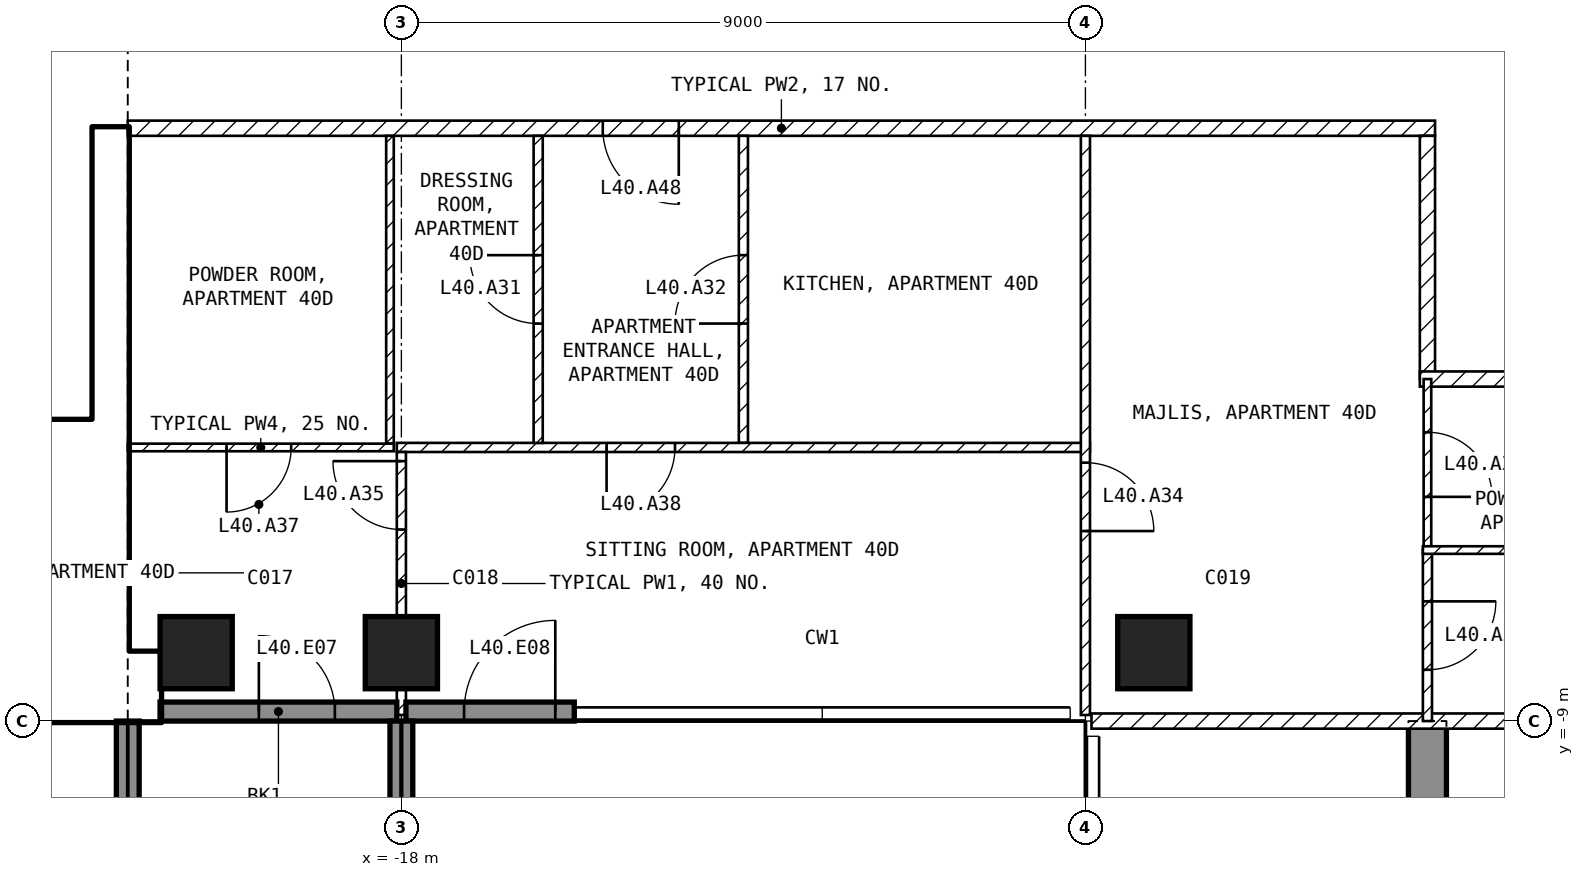
"""IFC4 building model, lengths in metres.
Left out: names, types, materials, properties, quantities, classifications, styles, units other than length and angle.
Written with IfcOpenShell. Run it as: python <this file> out.ifc"""

import sys

from ifc_helpers import new_model, si_unit, direction, frame, frame_2d, origin, origin_2d, place, context, subcontext, project, spatial, polyline, rectangle, outline, extrude, element, fill, save


model = new_model("IFC4")
c1 = context("Model", 3, precision=1e-05, world=origin(), true_north=direction((0.0, 1.0)))
c2 = subcontext(c1, "Body", "Model", "MODEL_VIEW")
j1 = project(units=[si_unit("LENGTHUNIT", "METRE"), si_unit("PLANEANGLEUNIT", "RADIAN")], contexts=[c1])
p1 = place(None, origin())
s1 = spatial("IfcSite", under=j1, at=p1, CompositionType="ELEMENT")
p2 = place(p1, origin())
s2 = spatial("IfcBuilding", under=s1, at=p2, CompositionType="ELEMENT")
p3 = place(p2, frame((0.0, 0.0, 166.6)))
s3 = spatial("IfcBuildingStorey", under=s2, at=p3, CompositionType="ELEMENT", Elevation=166.6)
for number, where, z_axis, x_axis in (
    (1, (-20.7, -8.1, -0.25), (0.0, 0.0, 1.0), (1.0, 0.0, 0.0)),
    (2, (-18.0, -8.1, -0.25), (0.0, 0.0, 1.0), (1.0, 0.0, 0.0)),
    (3, (-8.1, -8.1, -0.25), (0.0, 0.0, 1.0), (1.0, 0.0, 0.0)),
):
    element("IfcColumn", number, at=place(p3, frame(where, z_axis=z_axis, x_axis=x_axis)), inside=s3, PredefinedType="COLUMN", context=c2, shape_type="SweptSolid", body=[
        extrude(rectangle(XDim=0.95, YDim=0.95, at=origin_2d()), origin(), (0.0, 0.0, 1.0), 3.5),
    ])
p4 = place(p3, frame((-4.75, -20.225, -0.25), z_axis=(1.0, 0.0, 0.0), x_axis=(0.0, 1.0, 0.0)))
e4 = element("IfcWall", 4, at=p4, inside=s3, PredefinedType="SHEAR", context=c2, shape_type="SweptSolid", body=[
    extrude(outline(polyline([(0.0, 0.0), (6.725, 0.0), (6.725, 2.65), (9.125, 2.65), (9.125, 0.0), (11.225, 0.0), (11.225, 3.5), (0.0, 3.5), (0.0, 0.0)])), origin(), (0.0, 0.0, 1.0), 0.5),
])
p5 = place(p3, frame((-21.175, -8.875, 0.0), z_axis=(0.0, 0.0, 1.0), x_axis=(1.0, 0.0, 0.0)))
e5 = element("IfcWall", 5, at=p5, inside=s3, PredefinedType="SOLIDWALL", context=c2, shape_type="SweptSolid", body=[
    extrude(rectangle(XDim=3.115, YDim=0.25, at=frame_2d((1.558, 0.0))), origin(), (0.0, 0.0, 1.0), 3.25),
])
p6 = place(p5, frame((1.3, 0.0, 0.0)))
e6 = element("IfcOpeningElement", 6, at=p6, cuts=e5, PredefinedType="OPENING", context=c2, shape_type="SweptSolid", body=[
    extrude(rectangle(XDim=1.0, YDim=2.4, at=frame_2d((0.5, 1.2))), frame((0.0, 0.135, 0.0), z_axis=(0.0, -1.0, 0.0), x_axis=(1.0, 0.0, 0.0)), (0.0, 0.0, 1.0), 0.27),
])
p7 = place(p3, frame((-17.94, -8.875, 0.0), z_axis=(0.0, 0.0, 1.0), x_axis=(1.0, 0.0, 0.0)))
e7 = element("IfcWall", 7, at=p7, inside=s3, PredefinedType="SOLIDWALL", context=c2, shape_type="SweptSolid", body=[
    extrude(rectangle(XDim=2.215, YDim=0.25, at=frame_2d((1.107, 0.0))), origin(), (0.0, 0.0, 1.0), 3.25),
])
p8 = place(p7, frame((0.765, 0.0, 0.0)))
e8 = element("IfcOpeningElement", 8, at=p8, cuts=e7, PredefinedType="OPENING", context=c2, shape_type="SweptSolid", body=[
    extrude(rectangle(XDim=1.2, YDim=2.4, at=frame_2d((0.6, 1.2))), frame((0.0, 0.135, 0.0), z_axis=(0.0, -1.0, 0.0), x_axis=(1.0, 0.0, 0.0)), (0.0, 0.0, 1.0), 0.27),
])
for number, where, z_axis, x_axis in (
    (9, (-21.6, -9.0, 0.0), (0.0, 0.0, 1.0), (0.0, -1.0, 0.0)),
    (10, (-18.0, -9.0, 0.0), (0.0, 0.0, 1.0), (0.0, -1.0, 0.0)),
):
    element("IfcWall", number, at=place(p3, frame(where, z_axis=z_axis, x_axis=x_axis)), inside=s3, PredefinedType="SOLIDWALL", context=c2, shape_type="SweptSolid", body=[
        extrude(rectangle(XDim=2.7, YDim=0.3, at=frame_2d((1.35, 0.0))), origin(), (0.0, 0.0, 1.0), 3.25),
    ])
p9 = place(p3, frame((-30.2, -8.55, 0.0), z_axis=(0.0, 0.0, 1.0), x_axis=(1.0, 0.0, 0.0)))
e11 = element("IfcWall", 11, at=p9, inside=s3, PredefinedType="SHEAR", context=c2, shape_type="SweptSolid", body=[
    extrude(rectangle(XDim=9.025, YDim=0.9, at=frame_2d((4.512, 0.0))), origin(), (0.0, 0.0, 1.0), 3.25),
])
p10 = place(p3, frame((-21.825, -8.1, 0.0), z_axis=(0.0, 0.0, 1.0), x_axis=(0.0, 1.0, 0.0)))
e12 = element("IfcWall", 12, at=p10, inside=s3, PredefinedType="SHEAR", context=c2, shape_type="SweptSolid", body=[
    extrude(rectangle(XDim=6.9, YDim=0.45, at=frame_2d((3.45, 0.0))), origin(), (0.0, 0.0, 1.0), 3.25),
])
p11 = place(p3, frame((-28.35, -5.15, 0.0), z_axis=(0.0, 0.0, 1.0), x_axis=(1.0, 0.0, 0.0)))
e13 = element("IfcWall", 13, at=p11, inside=s3, PredefinedType="SOLIDWALL", context=c2, shape_type="SweptSolid", body=[
    extrude(rectangle(XDim=6.3, YDim=0.2, at=frame_2d((3.15, 0.0))), origin(), (0.0, 0.0, 1.0), 3.25),
])
p12 = place(p11, frame((5.1, 0.0, 0.0)))
e14 = element("IfcOpeningElement", 14, at=p12, cuts=e13, PredefinedType="OPENING", context=c2, shape_type="SweptSolid", body=[
    extrude(rectangle(XDim=1.0, YDim=2.1, at=frame_2d((0.5, 1.05))), frame((0.0, 0.11, 0.0), z_axis=(0.0, -1.0, 0.0), x_axis=(1.0, 0.0, 0.0)), (0.0, 0.0, 1.0), 0.22),
])
p13 = place(p3, frame((-4.4, -1.2, 0.0), z_axis=(0.0, 0.0, 1.0), x_axis=(-1.0, 0.0, 0.0)))
e15 = element("IfcWall", 15, at=p13, inside=s3, PredefinedType="PARTITIONING", context=c2, shape_type="SweptSolid", body=[
    extrude(rectangle(XDim=17.2, YDim=0.2, at=frame_2d((8.6, 0.0))), origin(), (0.0, 0.0, 1.0), 3.25),
])
p14 = place(p13, frame((9.95, 0.0, 0.0)))
e16 = element("IfcOpeningElement", 16, at=p14, cuts=e15, PredefinedType="OPENING", context=c2, shape_type="SweptSolid", body=[
    extrude(rectangle(XDim=1.0, YDim=2.1, at=frame_2d((0.5, 1.05))), frame((0.0, 0.11, 0.0), z_axis=(0.0, -1.0, 0.0), x_axis=(1.0, 0.0, 0.0)), (0.0, 0.0, 1.0), 0.22),
])
p15 = place(p3, frame((-4.5, -4.5, 0.0), z_axis=(0.0, 0.0, 1.0), x_axis=(0.0, 1.0, 0.0)))
e17 = element("IfcWall", 17, at=p15, inside=s3, PredefinedType="PARTITIONING", context=c2, shape_type="SweptSolid", body=[
    extrude(rectangle(XDim=3.2, YDim=0.2, at=frame_2d((1.6, 0.0))), origin(), (0.0, 0.0, 1.0), 3.25),
])
p16 = place(p3, frame((-1.1, -4.5, 0.0), z_axis=(0.0, 0.0, 1.0), x_axis=(-1.0, 0.0, 0.0)))
e18 = element("IfcWall", 18, at=p16, inside=s3, PredefinedType="PARTITIONING", context=c2, shape_type="SweptSolid", body=[
    extrude(rectangle(XDim=3.5, YDim=0.2, at=frame_2d((1.75, 0.0))), origin(), (0.0, 0.0, 1.0), 3.25),
])
p17 = place(p3, frame((8.92, -9.0, 0.0), z_axis=(0.0, 0.0, 1.0), x_axis=(-1.0, 0.0, 0.0)))
e19 = element("IfcWall", 19, at=p17, inside=s3, PredefinedType="PARTITIONING", context=c2, shape_type="SweptSolid", body=[
    extrude(rectangle(XDim=17.84, YDim=0.2, at=frame_2d((8.92, 0.0))), origin(), (0.0, 0.0, 1.0), 3.25),
])
p18 = place(p17, frame((8.42, 0.0, 0.0)))
e20 = element("IfcOpeningElement", 20, at=p18, cuts=e19, PredefinedType="OPENING", context=c2, shape_type="SweptSolid", body=[
    extrude(rectangle(XDim=1.0, YDim=2.1, at=frame_2d((0.5, 1.05))), frame((0.0, 0.11, 0.0), z_axis=(0.0, -1.0, 0.0), x_axis=(1.0, 0.0, 0.0)), (0.0, 0.0, 1.0), 0.22),
])
p19 = place(p3, frame((-13.5, -5.34, 0.0), z_axis=(0.0, 0.0, 1.0), x_axis=(0.0, 1.0, 0.0)))
e21 = element("IfcWall", 21, at=p19, inside=s3, PredefinedType="PARTITIONING", context=c2, shape_type="SweptSolid", body=[
    extrude(rectangle(XDim=4.04, YDim=0.12, at=frame_2d((2.02, 0.0))), origin(), (0.0, 0.0, 1.0), 3.25),
])
p20 = place(p19, frame((1.57, 0.0, 0.0)))
e22 = element("IfcOpeningElement", 22, at=p20, cuts=e21, PredefinedType="OPENING", context=c2, shape_type="SweptSolid", body=[
    extrude(rectangle(XDim=0.9, YDim=2.1, at=frame_2d((0.45, 1.05))), frame((0.0, 0.07, 0.0), z_axis=(0.0, -1.0, 0.0), x_axis=(1.0, 0.0, 0.0)), (0.0, 0.0, 1.0), 0.14),
])
p21 = place(p3, frame((-8.94, -5.4, 0.0), z_axis=(0.0, 0.0, 1.0), x_axis=(-1.0, 0.0, 0.0)))
e23 = element("IfcWall", 23, at=p21, inside=s3, PredefinedType="PARTITIONING", context=c2, shape_type="SweptSolid", body=[
    extrude(rectangle(XDim=9.12, YDim=0.12, at=frame_2d((4.56, 0.0))), origin(), (0.0, 0.0, 1.0), 3.25),
])
p22 = place(p21, frame((5.46, 0.0, 0.0)))
e24 = element("IfcOpeningElement", 24, at=p22, cuts=e23, PredefinedType="OPENING", context=c2, shape_type="SweptSolid", body=[
    extrude(rectangle(XDim=0.9, YDim=2.1, at=frame_2d((0.45, 1.05))), frame((0.0, 0.07, 0.0), z_axis=(0.0, -1.0, 0.0), x_axis=(1.0, 0.0, 0.0)), (0.0, 0.0, 1.0), 0.14),
])
p23 = place(p3, frame((-9.0, -1.3, 0.0), z_axis=(0.0, 0.0, 1.0), x_axis=(0.0, -1.0, 0.0)))
e25 = element("IfcWall", 25, at=p23, inside=s3, PredefinedType="PARTITIONING", context=c2, shape_type="SweptSolid", body=[
    extrude(rectangle(XDim=7.62, YDim=0.12, at=frame_2d((3.81, 0.0))), origin(), (0.0, 0.0, 1.0), 3.25),
])
p24 = place(p23, frame((4.3, 0.0, 0.0)))
e26 = element("IfcOpeningElement", 26, at=p24, cuts=e25, PredefinedType="OPENING", context=c2, shape_type="SweptSolid", body=[
    extrude(rectangle(XDim=0.9, YDim=2.1, at=frame_2d((0.45, 1.05))), frame((0.0, 0.07, 0.0), z_axis=(0.0, -1.0, 0.0), x_axis=(1.0, 0.0, 0.0)), (0.0, 0.0, 1.0), 0.14),
])
p25 = place(p3, frame((-16.2, -5.34, 0.0), z_axis=(0.0, 0.0, 1.0), x_axis=(0.0, 1.0, 0.0)))
e27 = element("IfcWall", 27, at=p25, inside=s3, PredefinedType="PARTITIONING", context=c2, shape_type="SweptSolid", body=[
    extrude(rectangle(XDim=4.04, YDim=0.12, at=frame_2d((2.02, 0.0))), origin(), (0.0, 0.0, 1.0), 3.25),
])
p26 = place(p25, frame((1.57, 0.0, 0.0)))
e28 = element("IfcOpeningElement", 28, at=p26, cuts=e27, PredefinedType="OPENING", context=c2, shape_type="SweptSolid", body=[
    extrude(rectangle(XDim=0.9, YDim=2.1, at=frame_2d((0.45, 1.05))), frame((0.0, 0.07, 0.0), z_axis=(0.0, -1.0, 0.0), x_axis=(1.0, 0.0, 0.0)), (0.0, 0.0, 1.0), 0.14),
])
p27 = place(p3, frame((-18.15, -5.35, 0.0), z_axis=(0.0, 0.0, 1.0), x_axis=(0.0, 1.0, 0.0)))
e29 = element("IfcWall", 29, at=p27, inside=s3, PredefinedType="PARTITIONING", context=c2, shape_type="SweptSolid", body=[
    extrude(rectangle(XDim=4.05, YDim=0.1, at=frame_2d((2.025, 0.0))), origin(), (0.0, 0.0, 1.0), 2.48),
])
p28 = place(p3, frame((-18.1, -5.4, 0.0), z_axis=(0.0, 0.0, 1.0), x_axis=(-1.0, 0.0, 0.0)))
e30 = element("IfcWall", 30, at=p28, inside=s3, PredefinedType="PARTITIONING", context=c2, shape_type="SweptSolid", body=[
    extrude(rectangle(XDim=3.5, YDim=0.1, at=frame_2d((1.75, 0.0))), origin(), (0.0, 0.0, 1.0), 3.25),
])
p29 = place(p28, frame((1.35, 0.0, 0.0)))
e31 = element("IfcOpeningElement", 31, at=p29, cuts=e30, PredefinedType="OPENING", context=c2, shape_type="SweptSolid", body=[
    extrude(rectangle(XDim=0.85, YDim=2.1, at=frame_2d((0.425, 1.05))), frame((0.0, 0.06, 0.0), z_axis=(0.0, -1.0, 0.0), x_axis=(1.0, 0.0, 0.0)), (0.0, 0.0, 1.0), 0.12),
])
p30 = place(p3, frame((-18.0, -8.92, 0.0), z_axis=(0.0, 0.0, 1.0), x_axis=(0.0, 1.0, 0.0)))
e32 = element("IfcWall", 32, at=p30, inside=s3, PredefinedType="PARTITIONING", context=c2, shape_type="SweptSolid", body=[
    extrude(rectangle(XDim=3.46, YDim=0.12, at=frame_2d((1.73, 0.0))), origin(), (0.0, 0.0, 1.0), 2.48),
])
p31 = place(p30, frame((2.44, 0.0, 0.0)))
e33 = element("IfcOpeningElement", 33, at=p31, cuts=e32, PredefinedType="OPENING", context=c2, shape_type="SweptSolid", body=[
    extrude(rectangle(XDim=0.9, YDim=2.1, at=frame_2d((0.45, 1.05))), frame((0.0, 0.07, 0.0), z_axis=(0.0, -1.0, 0.0), x_axis=(1.0, 0.0, 0.0)), (0.0, 0.0, 1.0), 0.14),
])
p32 = place(p3, frame((-4.5, -4.5, 0.0), z_axis=(0.0, 0.0, 1.0), x_axis=(0.0, -1.0, 0.0)))
e34 = element("IfcWall", 34, at=p32, inside=s3, PredefinedType="PARTITIONING", context=c2, shape_type="SweptSolid", body=[
    extrude(rectangle(XDim=2.25, YDim=0.1, at=frame_2d((1.125, 0.0))), origin(), (0.0, 0.0, 1.0), 3.25),
])
p33 = place(p32, frame((0.7, 0.0, 0.0)))
e35 = element("IfcOpeningElement", 35, at=p33, cuts=e34, PredefinedType="OPENING", context=c2, shape_type="SweptSolid", body=[
    extrude(rectangle(XDim=0.85, YDim=2.1, at=frame_2d((0.425, 1.05))), frame((0.0, 0.06, 0.0), z_axis=(0.0, -1.0, 0.0), x_axis=(1.0, 0.0, 0.0)), (0.0, 0.0, 1.0), 0.12),
])
p34 = place(p3, frame((-4.5, -6.75, 0.0), z_axis=(0.0, 0.0, 1.0), x_axis=(0.0, -1.0, 0.0)))
e36 = element("IfcWall", 36, at=p34, inside=s3, PredefinedType="PARTITIONING", context=c2, shape_type="SweptSolid", body=[
    extrude(rectangle(XDim=2.25, YDim=0.12, at=frame_2d((1.125, 0.0))), origin(), (0.0, 0.0, 1.0), 3.25),
])
p35 = place(p34, frame((0.675, 0.0, 0.0)))
e37 = element("IfcOpeningElement", 37, at=p35, cuts=e36, PredefinedType="OPENING", context=c2, shape_type="SweptSolid", body=[
    extrude(rectangle(XDim=0.9, YDim=2.1, at=frame_2d((0.45, 1.05))), frame((0.0, 0.07, 0.0), z_axis=(0.0, -1.0, 0.0), x_axis=(1.0, 0.0, 0.0)), (0.0, 0.0, 1.0), 0.14),
])
p36 = place(p3, frame((-1.1, -6.75, 0.0), z_axis=(0.0, 0.0, 1.0), x_axis=(-1.0, 0.0, 0.0)))
e38 = element("IfcWall", 38, at=p36, inside=s3, PredefinedType="PARTITIONING", context=c2, shape_type="SweptSolid", body=[
    extrude(rectangle(XDim=3.46, YDim=0.1, at=frame_2d((1.73, 0.0))), origin(), (0.0, 0.0, 1.0), 3.25),
])
p37 = place(p6, origin())
e39 = element("IfcDoor", 39, at=p37, inside=s3, OperationType="SINGLE_SWING_LEFT", PredefinedType="DOOR", context=c2, shape_type="SweptSolid", body=[
    extrude(rectangle(XDim=1.0, YDim=2.4, at=frame_2d((0.5, 1.2))), frame((0.0, 0.025, 0.0), z_axis=(0.0, -1.0, 0.0), x_axis=(1.0, 0.0, 0.0)), (0.0, 0.0, 1.0), 0.05),
])
fill(e6, e39)
p38 = place(p8, origin())
e40 = element("IfcDoor", 40, at=p38, inside=s3, OperationType="SINGLE_SWING_RIGHT", PredefinedType="DOOR", context=c2, shape_type="SweptSolid", body=[
    extrude(rectangle(XDim=1.2, YDim=2.4, at=frame_2d((0.6, 1.2))), frame((0.0, 0.025, 0.0), z_axis=(0.0, -1.0, 0.0), x_axis=(1.0, 0.0, 0.0)), (0.0, 0.0, 1.0), 0.05),
])
fill(e8, e40)
p39 = place(p12, origin())
e41 = element("IfcDoor", 41, at=p39, inside=s3, OperationType="SINGLE_SWING_LEFT", PredefinedType="DOOR", context=c2, shape_type="SweptSolid", body=[
    extrude(rectangle(XDim=1.0, YDim=2.1, at=frame_2d((0.5, 1.05))), frame((0.0, 0.025, 0.0), z_axis=(0.0, -1.0, 0.0), x_axis=(1.0, 0.0, 0.0)), (0.0, 0.0, 1.0), 0.05),
])
fill(e14, e41)
p40 = place(p26, origin())
e42 = element("IfcDoor", 42, at=p40, inside=s3, OperationType="SINGLE_SWING_RIGHT", PredefinedType="DOOR", context=c2, shape_type="SweptSolid", body=[
    extrude(rectangle(XDim=0.9, YDim=2.1, at=frame_2d((0.45, 1.05))), frame((0.0, 0.025, 0.0), z_axis=(0.0, -1.0, 0.0), x_axis=(1.0, 0.0, 0.0)), (0.0, 0.0, 1.0), 0.05),
])
fill(e28, e42)
p41 = place(p20, origin())
e43 = element("IfcDoor", 43, at=p41, inside=s3, OperationType="SINGLE_SWING_LEFT", PredefinedType="DOOR", context=c2, shape_type="SweptSolid", body=[
    extrude(rectangle(XDim=0.9, YDim=2.1, at=frame_2d((0.45, 1.05))), frame((0.0, 0.025, 0.0), z_axis=(0.0, -1.0, 0.0), x_axis=(1.0, 0.0, 0.0)), (0.0, 0.0, 1.0), 0.05),
])
fill(e22, e43)
p42 = place(p35, origin())
e44 = element("IfcDoor", 44, at=p42, inside=s3, OperationType="SINGLE_SWING_LEFT", PredefinedType="DOOR", context=c2, shape_type="SweptSolid", body=[
    extrude(rectangle(XDim=0.9, YDim=2.1, at=frame_2d((0.45, 1.05))), frame((0.0, 0.025, 0.0), z_axis=(0.0, -1.0, 0.0), x_axis=(1.0, 0.0, 0.0)), (0.0, 0.0, 1.0), 0.05),
])
fill(e37, e44)
p43 = place(p24, origin())
e45 = element("IfcDoor", 45, at=p43, inside=s3, OperationType="SINGLE_SWING_RIGHT", PredefinedType="DOOR", context=c2, shape_type="SweptSolid", body=[
    extrude(rectangle(XDim=0.9, YDim=2.1, at=frame_2d((0.45, 1.05))), frame((0.0, 0.025, 0.0), z_axis=(0.0, -1.0, 0.0), x_axis=(1.0, 0.0, 0.0)), (0.0, 0.0, 1.0), 0.05),
])
fill(e26, e45)
p44 = place(p31, origin())
e46 = element("IfcDoor", 46, at=p44, inside=s3, OperationType="SINGLE_SWING_RIGHT", PredefinedType="DOOR", context=c2, shape_type="SweptSolid", body=[
    extrude(rectangle(XDim=0.9, YDim=2.1, at=frame_2d((0.45, 1.05))), frame((0.0, 0.025, 0.0), z_axis=(0.0, -1.0, 0.0), x_axis=(1.0, 0.0, 0.0)), (0.0, 0.0, 1.0), 0.05),
])
fill(e33, e46)
p45 = place(p33, origin())
e47 = element("IfcDoor", 47, at=p45, inside=s3, OperationType="SINGLE_SWING_RIGHT", PredefinedType="DOOR", context=c2, shape_type="SweptSolid", body=[
    extrude(rectangle(XDim=0.85, YDim=2.1, at=frame_2d((0.425, 1.05))), frame((0.0, 0.025, 0.0), z_axis=(0.0, -1.0, 0.0), x_axis=(1.0, 0.0, 0.0)), (0.0, 0.0, 1.0), 0.05),
])
fill(e35, e47)
p46 = place(p29, origin())
e48 = element("IfcDoor", 48, at=p46, inside=s3, OperationType="SINGLE_SWING_RIGHT", PredefinedType="DOOR", context=c2, shape_type="SweptSolid", body=[
    extrude(rectangle(XDim=0.85, YDim=2.1, at=frame_2d((0.425, 1.05))), frame((0.0, 0.025, 0.0), z_axis=(0.0, -1.0, 0.0), x_axis=(1.0, 0.0, 0.0)), (0.0, 0.0, 1.0), 0.05),
])
fill(e31, e48)
p47 = place(p22, origin())
e49 = element("IfcDoor", 49, at=p47, inside=s3, OperationType="SINGLE_SWING_RIGHT", PredefinedType="DOOR", context=c2, shape_type="SweptSolid", body=[
    extrude(rectangle(XDim=0.9, YDim=2.1, at=frame_2d((0.45, 1.05))), frame((0.0, 0.025, 0.0), z_axis=(0.0, -1.0, 0.0), x_axis=(1.0, 0.0, 0.0)), (0.0, 0.0, 1.0), 0.05),
])
fill(e24, e49)
p48 = place(p14, origin())
e50 = element("IfcDoor", 50, at=p48, inside=s3, OperationType="SINGLE_SWING_LEFT", PredefinedType="DOOR", context=c2, shape_type="SweptSolid", body=[
    extrude(rectangle(XDim=1.0, YDim=2.1, at=frame_2d((0.5, 1.05))), frame((0.0, 0.025, 0.0), z_axis=(0.0, -1.0, 0.0), x_axis=(1.0, 0.0, 0.0)), (0.0, 0.0, 1.0), 0.05),
])
fill(e16, e50)
save(model, sys.argv[1])
